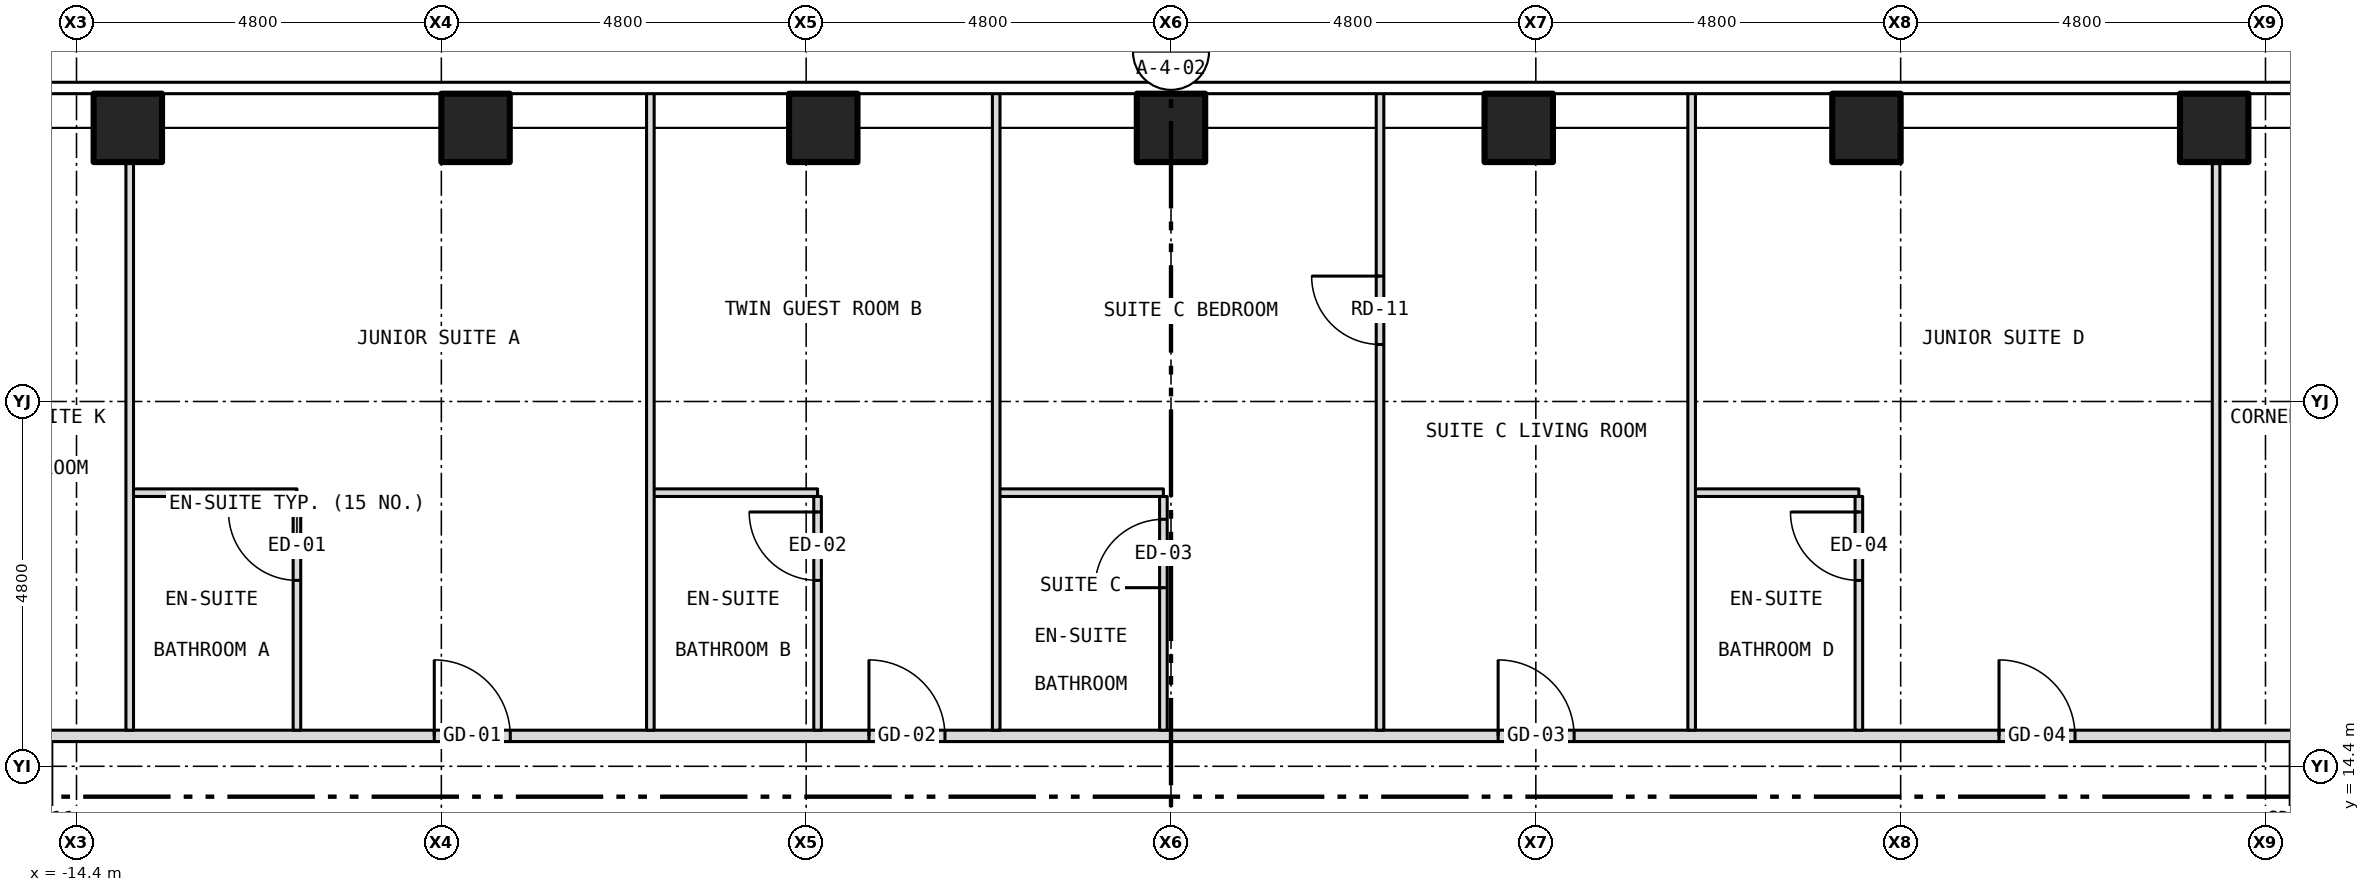
"""IFC4 building model, lengths in metres.
Left out: names, types, materials, properties, quantities, classifications, styles, units other than length and angle.
Written with IfcOpenShell. Run it as: python <this file> out.ifc"""

import sys

from ifc_helpers import new_model, si_unit, direction, frame, frame_2d, origin, origin_2d, place, context, subcontext, project, spatial, rectangle, hollow_rectangle, extrude, element, fill, save


model = new_model("IFC4")
c1 = context("Model", 3, precision=1e-05, world=origin(), true_north=direction((0.0, 1.0)))
c2 = subcontext(c1, "Body", "Model", "MODEL_VIEW")
j1 = project(units=[si_unit("LENGTHUNIT", "METRE"), si_unit("PLANEANGLEUNIT", "RADIAN")], contexts=[c1])
p1 = place(None, origin())
s1 = spatial("IfcSite", under=j1, at=p1, CompositionType="ELEMENT")
p2 = place(p1, origin())
s2 = spatial("IfcBuilding", under=s1, at=p2, CompositionType="ELEMENT")
p3 = place(p2, frame((0.0, 0.0, 96.0)))
s3 = spatial("IfcBuildingStorey", under=s2, at=p3, CompositionType="ELEMENT", Elevation=96.0)
for number, where, z_axis, x_axis in (
    (1, (-13.725, 22.8, -0.15), (0.0, 0.0, 1.0), (1.0, 0.0, 0.0)),
    (2, (-9.15, 22.8, -0.15), (0.0, 0.0, 1.0), (1.0, 0.0, 0.0)),
    (3, (-4.575, 22.8, -0.15), (0.0, 0.0, 1.0), (1.0, 0.0, 0.0)),
    (4, (0.0, 22.8, -0.15), (0.0, 0.0, 1.0), (1.0, 0.0, 0.0)),
    (5, (4.575, 22.8, -0.15), (0.0, 0.0, 1.0), (1.0, 0.0, 0.0)),
    (6, (9.15, 22.8, -0.15), (0.0, 0.0, 1.0), (1.0, 0.0, 0.0)),
    (7, (13.725, 22.8, -0.15), (0.0, 0.0, 1.0), (1.0, 0.0, 0.0)),
):
    element("IfcColumn", number, at=place(p3, frame(where, z_axis=z_axis, x_axis=x_axis)), inside=s3, PredefinedType="COLUMN", context=c2, shape_type="SweptSolid", body=[
        extrude(hollow_rectangle(XDim=0.9, YDim=0.9, WallThickness=0.05, at=origin_2d()), origin(), (0.0, 0.0, 1.0), 3.5),
    ])
p4 = place(p3, frame((-14.8, 14.8, 0.0), z_axis=(0.0, 0.0, 1.0), x_axis=(1.0, 0.0, 0.0)))
e8 = element("IfcWall", 8, at=p4, inside=s3, PredefinedType="PARTITIONING", context=c2, shape_type="SweptSolid", body=[
    extrude(rectangle(XDim=29.6, YDim=0.15, at=frame_2d((14.8, 0.0))), origin(), (0.0, 0.0, 1.0), 3.35),
])
p5 = place(p4, frame((5.107, 0.0, 0.0)))
e9 = element("IfcOpeningElement", 9, at=p5, cuts=e8, PredefinedType="OPENING", context=c2, shape_type="SweptSolid", body=[
    extrude(rectangle(XDim=1.0, YDim=2.1, at=frame_2d((0.5, 1.05))), frame((0.0, 0.087, 0.0), z_axis=(0.0, -1.0, 0.0), x_axis=(1.0, 0.0, 0.0)), (0.0, 0.0, 1.0), 0.174),
])
p6 = place(p4, frame((10.826, 0.0, 0.0)))
e10 = element("IfcOpeningElement", 10, at=p6, cuts=e8, PredefinedType="OPENING", context=c2, shape_type="SweptSolid", body=[
    extrude(rectangle(XDim=1.0, YDim=2.1, at=frame_2d((0.5, 1.05))), frame((0.0, 0.087, 0.0), z_axis=(0.0, -1.0, 0.0), x_axis=(1.0, 0.0, 0.0)), (0.0, 0.0, 1.0), 0.174),
])
p7 = place(p4, frame((19.104, 0.0, 0.0)))
e11 = element("IfcOpeningElement", 11, at=p7, cuts=e8, PredefinedType="OPENING", context=c2, shape_type="SweptSolid", body=[
    extrude(rectangle(XDim=1.0, YDim=2.1, at=frame_2d((0.5, 1.05))), frame((0.0, 0.087, 0.0), z_axis=(0.0, -1.0, 0.0), x_axis=(1.0, 0.0, 0.0)), (0.0, 0.0, 1.0), 0.174),
])
p8 = place(p4, frame((25.694, 0.0, 0.0)))
e12 = element("IfcOpeningElement", 12, at=p8, cuts=e8, PredefinedType="OPENING", context=c2, shape_type="SweptSolid", body=[
    extrude(rectangle(XDim=1.0, YDim=2.1, at=frame_2d((0.5, 1.05))), frame((0.0, 0.087, 0.0), z_axis=(0.0, -1.0, 0.0), x_axis=(1.0, 0.0, 0.0)), (0.0, 0.0, 1.0), 0.174),
])
p9 = place(p3, frame((-13.7, 18.0, 0.0), z_axis=(0.0, 0.0, 1.0), x_axis=(1.0, 0.0, 0.0)))
e13 = element("IfcWall", 13, at=p9, inside=s3, PredefinedType="PARTITIONING", context=c2, shape_type="SweptSolid", body=[
    extrude(rectangle(XDim=2.2, YDim=0.1, at=frame_2d((1.1, 0.0))), origin(), (0.0, 0.0, 1.0), 3.35),
])
p10 = place(p3, frame((-6.85, 18.0, 0.0), z_axis=(0.0, 0.0, 1.0), x_axis=(1.0, 0.0, 0.0)))
e14 = element("IfcWall", 14, at=p10, inside=s3, PredefinedType="PARTITIONING", context=c2, shape_type="SweptSolid", body=[
    extrude(rectangle(XDim=2.2, YDim=0.1, at=frame_2d((1.1, 0.0))), origin(), (0.0, 0.0, 1.0), 3.35),
])
for number, where, z_axis, x_axis in (
    (15, (-2.3, 18.0, 0.0), (0.0, 0.0, 1.0), (1.0, 0.0, 0.0)),
    (16, (6.85, 18.0, 0.0), (0.0, 0.0, 1.0), (1.0, 0.0, 0.0)),
):
    element("IfcWall", number, at=place(p3, frame(where, z_axis=z_axis, x_axis=x_axis)), inside=s3, PredefinedType="PARTITIONING", context=c2, shape_type="SweptSolid", body=[
        extrude(rectangle(XDim=2.2, YDim=0.1, at=frame_2d((1.1, 0.0))), origin(), (0.0, 0.0, 1.0), 3.35),
    ])
p11 = place(p3, frame((-13.7, 14.875, 0.0), z_axis=(0.0, 0.0, 1.0), x_axis=(0.0, 1.0, 0.0)))
e17 = element("IfcWall", 17, at=p11, inside=s3, PredefinedType="PARTITIONING", context=c2, shape_type="SweptSolid", body=[
    extrude(rectangle(XDim=7.805, YDim=0.1, at=frame_2d((3.902, 0.0))), origin(), (0.0, 0.0, 1.0), 3.35),
])
p12 = place(p3, frame((-11.5, 14.875, 0.0), z_axis=(0.0, 0.0, 1.0), x_axis=(0.0, 1.0, 0.0)))
e18 = element("IfcWall", 18, at=p12, inside=s3, PredefinedType="PARTITIONING", context=c2, shape_type="SweptSolid", body=[
    extrude(rectangle(XDim=3.075, YDim=0.1, at=frame_2d((1.538, 0.0))), origin(), (0.0, 0.0, 1.0), 3.35),
])
p13 = place(p12, frame((1.971, 0.0, 0.0)))
e19 = element("IfcOpeningElement", 19, at=p13, cuts=e18, PredefinedType="OPENING", context=c2, shape_type="SweptSolid", body=[
    extrude(rectangle(XDim=0.9, YDim=2.1, at=frame_2d((0.45, 1.05))), frame((0.0, 0.062, 0.0), z_axis=(0.0, -1.0, 0.0), x_axis=(1.0, 0.0, 0.0)), (0.0, 0.0, 1.0), 0.124),
])
p14 = place(p3, frame((-6.85, 14.875, 0.0), z_axis=(0.0, 0.0, 1.0), x_axis=(0.0, 1.0, 0.0)))
e20 = element("IfcWall", 20, at=p14, inside=s3, PredefinedType="PARTITIONING", context=c2, shape_type="SweptSolid", body=[
    extrude(rectangle(XDim=8.405, YDim=0.1, at=frame_2d((4.203, 0.0))), origin(), (0.0, 0.0, 1.0), 3.35),
])
p15 = place(p3, frame((-4.65, 14.875, 0.0), z_axis=(0.0, 0.0, 1.0), x_axis=(0.0, 1.0, 0.0)))
e21 = element("IfcWall", 21, at=p15, inside=s3, PredefinedType="PARTITIONING", context=c2, shape_type="SweptSolid", body=[
    extrude(rectangle(XDim=3.075, YDim=0.1, at=frame_2d((1.538, 0.0))), origin(), (0.0, 0.0, 1.0), 2.817),
])
p16 = place(p15, frame((1.971, 0.0, 0.0)))
e22 = element("IfcOpeningElement", 22, at=p16, cuts=e21, PredefinedType="OPENING", context=c2, shape_type="SweptSolid", body=[
    extrude(rectangle(XDim=0.9, YDim=2.1, at=frame_2d((0.45, 1.05))), frame((0.0, 0.062, 0.0), z_axis=(0.0, -1.0, 0.0), x_axis=(1.0, 0.0, 0.0)), (0.0, 0.0, 1.0), 0.124),
])
p17 = place(p3, frame((-2.3, 14.875, 0.0), z_axis=(0.0, 0.0, 1.0), x_axis=(0.0, 1.0, 0.0)))
e23 = element("IfcWall", 23, at=p17, inside=s3, PredefinedType="PARTITIONING", context=c2, shape_type="SweptSolid", body=[
    extrude(rectangle(XDim=8.405, YDim=0.1, at=frame_2d((4.203, 0.0))), origin(), (0.0, 0.0, 1.0), 3.35),
])
p18 = place(p3, frame((-0.1, 14.875, 0.0), z_axis=(0.0, 0.0, 1.0), x_axis=(0.0, 1.0, 0.0)))
e24 = element("IfcWall", 24, at=p18, inside=s3, PredefinedType="PARTITIONING", context=c2, shape_type="SweptSolid", body=[
    extrude(rectangle(XDim=3.075, YDim=0.1, at=frame_2d((1.538, 0.0))), origin(), (0.0, 0.0, 1.0), 2.728),
])
p19 = place(p18, frame((1.875, 0.0, 0.0)))
e25 = element("IfcOpeningElement", 25, at=p19, cuts=e24, PredefinedType="OPENING", context=c2, shape_type="SweptSolid", body=[
    extrude(rectangle(XDim=0.9, YDim=2.1, at=frame_2d((0.45, 1.05))), frame((0.0, 0.062, 0.0), z_axis=(0.0, -1.0, 0.0), x_axis=(1.0, 0.0, 0.0)), (0.0, 0.0, 1.0), 0.124),
])
p20 = place(p3, frame((2.75, 14.875, 0.0), z_axis=(0.0, 0.0, 1.0), x_axis=(0.0, 1.0, 0.0)))
e26 = element("IfcWall", 26, at=p20, inside=s3, PredefinedType="PARTITIONING", context=c2, shape_type="SweptSolid", body=[
    extrude(rectangle(XDim=8.405, YDim=0.1, at=frame_2d((4.203, 0.0))), origin(), (0.0, 0.0, 1.0), 3.35),
])
p21 = place(p20, frame((5.075, 0.0, 0.0)))
e27 = element("IfcOpeningElement", 27, at=p21, cuts=e26, PredefinedType="OPENING", context=c2, shape_type="SweptSolid", body=[
    extrude(rectangle(XDim=0.9, YDim=2.1, at=frame_2d((0.45, 1.05))), frame((0.0, 0.062, 0.0), z_axis=(0.0, -1.0, 0.0), x_axis=(1.0, 0.0, 0.0)), (0.0, 0.0, 1.0), 0.124),
])
p22 = place(p3, frame((6.85, 14.875, 0.0), z_axis=(0.0, 0.0, 1.0), x_axis=(0.0, 1.0, 0.0)))
e28 = element("IfcWall", 28, at=p22, inside=s3, PredefinedType="PARTITIONING", context=c2, shape_type="SweptSolid", body=[
    extrude(rectangle(XDim=8.405, YDim=0.1, at=frame_2d((4.203, 0.0))), origin(), (0.0, 0.0, 1.0), 3.35),
])
p23 = place(p3, frame((9.05, 14.875, 0.0), z_axis=(0.0, 0.0, 1.0), x_axis=(0.0, 1.0, 0.0)))
e29 = element("IfcWall", 29, at=p23, inside=s3, PredefinedType="PARTITIONING", context=c2, shape_type="SweptSolid", body=[
    extrude(rectangle(XDim=3.075, YDim=0.1, at=frame_2d((1.538, 0.0))), origin(), (0.0, 0.0, 1.0), 3.35),
])
p24 = place(p23, frame((1.971, 0.0, 0.0)))
e30 = element("IfcOpeningElement", 30, at=p24, cuts=e29, PredefinedType="OPENING", context=c2, shape_type="SweptSolid", body=[
    extrude(rectangle(XDim=0.9, YDim=2.1, at=frame_2d((0.45, 1.05))), frame((0.0, 0.062, 0.0), z_axis=(0.0, -1.0, 0.0), x_axis=(1.0, 0.0, 0.0)), (0.0, 0.0, 1.0), 0.124),
])
p25 = place(p3, frame((13.75, 14.875, 0.0), z_axis=(0.0, 0.0, 1.0), x_axis=(0.0, 1.0, 0.0)))
e31 = element("IfcWall", 31, at=p25, inside=s3, PredefinedType="PARTITIONING", context=c2, shape_type="SweptSolid", body=[
    extrude(rectangle(XDim=7.805, YDim=0.1, at=frame_2d((3.902, 0.0))), origin(), (0.0, 0.0, 1.0), 3.35),
])
p26 = place(p5, origin())
e32 = element("IfcDoor", 32, at=p26, inside=s3, OperationType="SINGLE_SWING_LEFT", PredefinedType="DOOR", context=c2, shape_type="SweptSolid", body=[
    extrude(rectangle(XDim=1.0, YDim=2.1, at=frame_2d((0.5, 1.05))), frame((0.0, 0.025, 0.0), z_axis=(0.0, -1.0, 0.0), x_axis=(1.0, 0.0, 0.0)), (0.0, 0.0, 1.0), 0.05),
])
fill(e9, e32)
p27 = place(p13, origin())
e33 = element("IfcDoor", 33, at=p27, inside=s3, OperationType="SINGLE_SWING_RIGHT", PredefinedType="DOOR", context=c2, shape_type="SweptSolid", body=[
    extrude(rectangle(XDim=0.9, YDim=2.1, at=frame_2d((0.45, 1.05))), frame((0.0, 0.025, 0.0), z_axis=(0.0, -1.0, 0.0), x_axis=(1.0, 0.0, 0.0)), (0.0, 0.0, 1.0), 0.05),
])
fill(e19, e33)
p28 = place(p6, origin())
e34 = element("IfcDoor", 34, at=p28, inside=s3, OperationType="SINGLE_SWING_LEFT", PredefinedType="DOOR", context=c2, shape_type="SweptSolid", body=[
    extrude(rectangle(XDim=1.0, YDim=2.1, at=frame_2d((0.5, 1.05))), frame((0.0, 0.025, 0.0), z_axis=(0.0, -1.0, 0.0), x_axis=(1.0, 0.0, 0.0)), (0.0, 0.0, 1.0), 0.05),
])
fill(e10, e34)
p29 = place(p16, origin())
e35 = element("IfcDoor", 35, at=p29, inside=s3, OperationType="SINGLE_SWING_RIGHT", PredefinedType="DOOR", context=c2, shape_type="SweptSolid", body=[
    extrude(rectangle(XDim=0.9, YDim=2.1, at=frame_2d((0.45, 1.05))), frame((0.0, 0.025, 0.0), z_axis=(0.0, -1.0, 0.0), x_axis=(1.0, 0.0, 0.0)), (0.0, 0.0, 1.0), 0.05),
])
fill(e22, e35)
p30 = place(p7, origin())
e36 = element("IfcDoor", 36, at=p30, inside=s3, OperationType="SINGLE_SWING_LEFT", PredefinedType="DOOR", context=c2, shape_type="SweptSolid", body=[
    extrude(rectangle(XDim=1.0, YDim=2.1, at=frame_2d((0.5, 1.05))), frame((0.0, 0.025, 0.0), z_axis=(0.0, -1.0, 0.0), x_axis=(1.0, 0.0, 0.0)), (0.0, 0.0, 1.0), 0.05),
])
fill(e11, e36)
p31 = place(p21, origin())
e37 = element("IfcDoor", 37, at=p31, inside=s3, OperationType="SINGLE_SWING_RIGHT", PredefinedType="DOOR", context=c2, shape_type="SweptSolid", body=[
    extrude(rectangle(XDim=0.9, YDim=2.1, at=frame_2d((0.45, 1.05))), frame((0.0, 0.025, 0.0), z_axis=(0.0, -1.0, 0.0), x_axis=(1.0, 0.0, 0.0)), (0.0, 0.0, 1.0), 0.05),
])
fill(e27, e37)
p32 = place(p19, origin())
e38 = element("IfcDoor", 38, at=p32, inside=s3, OperationType="SINGLE_SWING_LEFT", PredefinedType="DOOR", context=c2, shape_type="SweptSolid", body=[
    extrude(rectangle(XDim=0.9, YDim=2.1, at=frame_2d((0.45, 1.05))), frame((0.0, 0.025, 0.0), z_axis=(0.0, -1.0, 0.0), x_axis=(1.0, 0.0, 0.0)), (0.0, 0.0, 1.0), 0.05),
])
fill(e25, e38)
p33 = place(p8, origin())
e39 = element("IfcDoor", 39, at=p33, inside=s3, OperationType="SINGLE_SWING_LEFT", PredefinedType="DOOR", context=c2, shape_type="SweptSolid", body=[
    extrude(rectangle(XDim=1.0, YDim=2.1, at=frame_2d((0.5, 1.05))), frame((0.0, 0.025, 0.0), z_axis=(0.0, -1.0, 0.0), x_axis=(1.0, 0.0, 0.0)), (0.0, 0.0, 1.0), 0.05),
])
fill(e12, e39)
p34 = place(p24, origin())
e40 = element("IfcDoor", 40, at=p34, inside=s3, OperationType="SINGLE_SWING_RIGHT", PredefinedType="DOOR", context=c2, shape_type="SweptSolid", body=[
    extrude(rectangle(XDim=0.9, YDim=2.1, at=frame_2d((0.45, 1.05))), frame((0.0, 0.025, 0.0), z_axis=(0.0, -1.0, 0.0), x_axis=(1.0, 0.0, 0.0)), (0.0, 0.0, 1.0), 0.05),
])
fill(e30, e40)
save(model, sys.argv[1])
